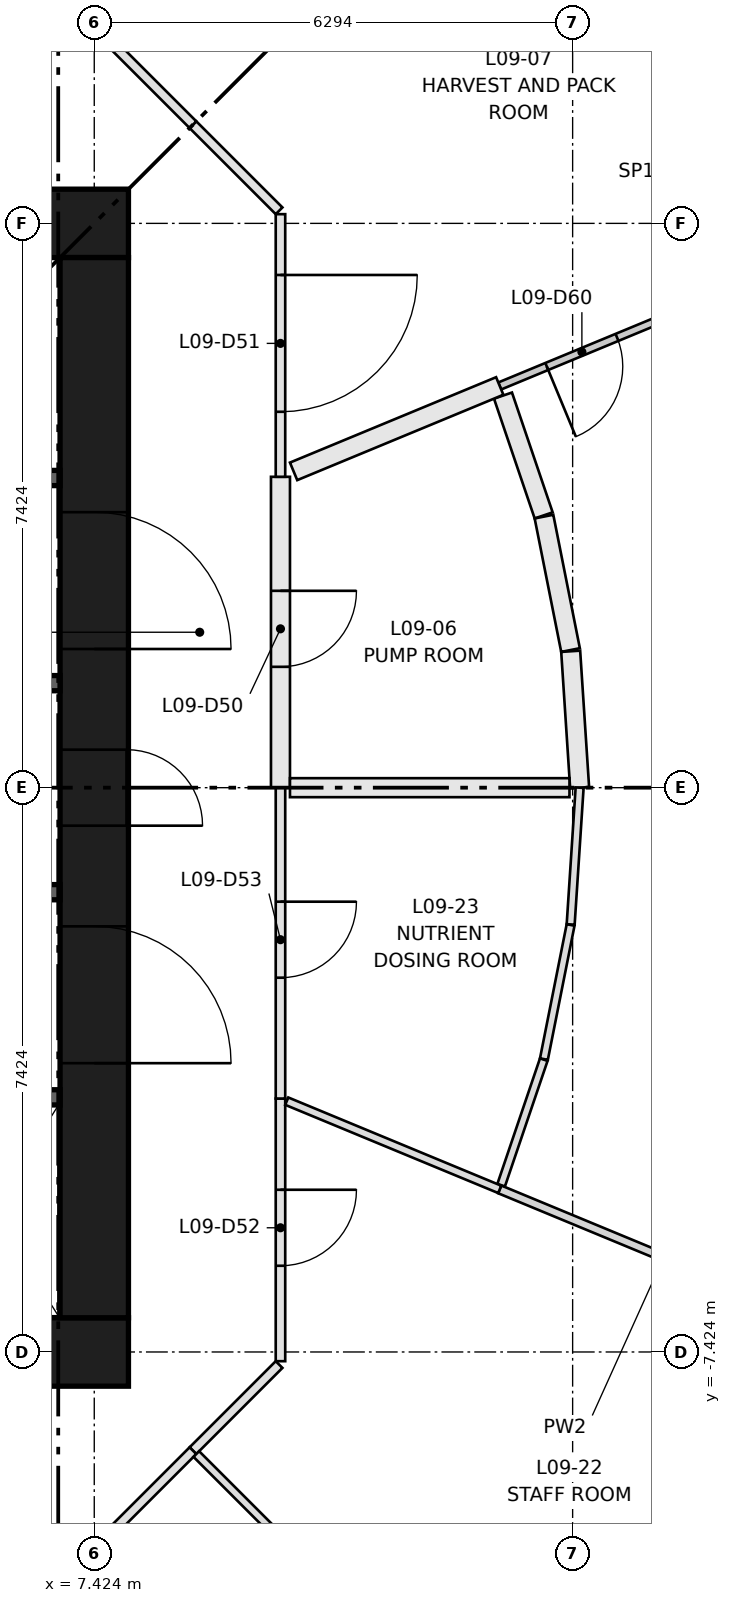
"""IFC4 building model, lengths in metres.
Left out: names, types, materials, properties, quantities, classifications, styles, units other than length and angle.
Written with IfcOpenShell. Run it as: python <this file> out.ifc"""

import sys

from ifc_helpers import new_model, si_unit, direction, frame, frame_2d, origin, place, context, subcontext, project, spatial, rectangle, extrude, element, fill, save


model = new_model("IFC4")
c1 = context("Model", 3, precision=1e-05, world=origin(), true_north=direction((0.0, 1.0)))
c2 = subcontext(c1, "Body", "Model", "MODEL_VIEW")
j1 = project(units=[si_unit("LENGTHUNIT", "METRE"), si_unit("PLANEANGLEUNIT", "RADIAN")], contexts=[c1])
p1 = place(None, origin())
s1 = spatial("IfcSite", under=j1, at=p1, CompositionType="ELEMENT")
p2 = place(p1, origin())
s2 = spatial("IfcBuilding", under=s1, at=p2, CompositionType="ELEMENT")
p3 = place(p2, frame((0.0, 0.0, 37.15)))
s3 = spatial("IfcBuildingStorey", under=s2, at=p3, CompositionType="ELEMENT", Elevation=37.15)
for number, where, z_axis, x_axis in (
    (1, (-7.874, -7.424, 0.0), (0.0, 0.0, 1.0), (1.0, 0.0, 0.0)),
    (2, (-7.874, 7.424, 0.0), (0.0, 0.0, 1.0), (1.0, 0.0, 0.0)),
):
    element("IfcWall", number, at=place(p3, frame(where, z_axis=z_axis, x_axis=x_axis)), inside=s3, PredefinedType="SHEAR", context=c2, shape_type="SweptSolid", body=[
        extrude(rectangle(XDim=15.748, YDim=0.9, at=frame_2d((7.874, 0.0))), origin(), (0.0, 0.0, 1.0), 3.65),
    ])
p4 = place(p3, frame((7.424, -6.974, 0.0), z_axis=(0.0, 0.0, 1.0), x_axis=(0.0, 1.0, 0.0)))
e3 = element("IfcWall", 3, at=p4, inside=s3, PredefinedType="SHEAR", context=c2, shape_type="SweptSolid", body=[
    extrude(rectangle(XDim=13.948, YDim=0.9, at=frame_2d((6.974, 0.0))), origin(), (0.0, 0.0, 1.0), 3.65),
])
p5 = place(p4, frame((6.474, 0.0, 0.0)))
e4 = element("IfcOpeningElement", 4, at=p5, cuts=e3, PredefinedType="OPENING", context=c2, shape_type="SweptSolid", body=[
    extrude(rectangle(XDim=1.0, YDim=2.1, at=frame_2d((0.5, 1.05))), frame((0.0, 0.46, 0.0), z_axis=(0.0, -1.0, 0.0), x_axis=(1.0, 0.0, 0.0)), (0.0, 0.0, 1.0), 0.92),
])
p6 = place(p4, frame((3.35, 0.0, 0.0)))
e5 = element("IfcOpeningElement", 5, at=p6, cuts=e3, PredefinedType="OPENING", context=c2, shape_type="SweptSolid", body=[
    extrude(rectangle(XDim=1.8, YDim=2.1, at=frame_2d((0.9, 1.05))), frame((0.0, 0.46, 0.0), z_axis=(0.0, -1.0, 0.0), x_axis=(1.0, 0.0, 0.0)), (0.0, 0.0, 1.0), 0.92),
])
p7 = place(p4, frame((8.799, 0.0, 0.0)))
e6 = element("IfcOpeningElement", 6, at=p7, cuts=e3, PredefinedType="OPENING", context=c2, shape_type="SweptSolid", body=[
    extrude(rectangle(XDim=1.8, YDim=2.1, at=frame_2d((0.9, 1.05))), frame((0.0, 0.46, 0.0), z_axis=(0.0, -1.0, 0.0), x_axis=(1.0, 0.0, 0.0)), (0.0, 0.0, 1.0), 0.92),
])
p8 = place(p3, frame((-6.974, -4.074, 0.0), z_axis=(0.0, 0.0, 1.0), x_axis=(1.0, 0.0, 0.0)))
e7 = element("IfcWall", 7, at=p8, inside=s3, PredefinedType="SHEAR", context=c2, shape_type="SweptSolid", body=[
    extrude(rectangle(XDim=13.948, YDim=0.2, at=frame_2d((6.974, 0.0))), origin(), (0.0, 0.0, 1.0), 3.3),
])
p9 = place(p8, frame((0.918, 0.0, 0.0)))
e8 = element("IfcOpeningElement", 8, at=p9, cuts=e7, PredefinedType="OPENING", context=c2, shape_type="SweptSolid", body=[
    extrude(rectangle(XDim=1.1, YDim=2.1, at=frame_2d((0.55, 1.05))), frame((0.0, 0.11, 0.0), z_axis=(0.0, -1.0, 0.0), x_axis=(1.0, 0.0, 0.0)), (0.0, 0.0, 1.0), 0.22),
])
p10 = place(p8, frame((4.055, 0.0, 0.0)))
e9 = element("IfcOpeningElement", 9, at=p10, cuts=e7, PredefinedType="OPENING", context=c2, shape_type="SweptSolid", body=[
    extrude(rectangle(XDim=1.1, YDim=2.1, at=frame_2d((0.55, 1.05))), frame((0.0, 0.11, 0.0), z_axis=(0.0, -1.0, 0.0), x_axis=(1.0, 0.0, 0.0)), (0.0, 0.0, 1.0), 0.22),
])
p11 = place(p8, frame((6.658, 0.0, 0.0)))
e10 = element("IfcOpeningElement", 10, at=p11, cuts=e7, PredefinedType="OPENING", context=c2, shape_type="SweptSolid", body=[
    extrude(rectangle(XDim=1.0, YDim=2.1, at=frame_2d((0.5, 1.05))), frame((0.0, 0.11, 0.0), z_axis=(0.0, -1.0, 0.0), x_axis=(1.0, 0.0, 0.0)), (0.0, 0.0, 1.0), 0.22),
])
p12 = place(p8, frame((8.627, 0.0, 0.0)))
e11 = element("IfcOpeningElement", 11, at=p12, cuts=e7, PredefinedType="OPENING", context=c2, shape_type="SweptSolid", body=[
    extrude(rectangle(XDim=1.0, YDim=2.1, at=frame_2d((0.5, 1.05))), frame((0.0, 0.11, 0.0), z_axis=(0.0, -1.0, 0.0), x_axis=(1.0, 0.0, 0.0)), (0.0, 0.0, 1.0), 0.22),
])
p13 = place(p8, frame((10.595, 0.0, 0.0)))
e12 = element("IfcOpeningElement", 12, at=p13, cuts=e7, PredefinedType="OPENING", context=c2, shape_type="SweptSolid", body=[
    extrude(rectangle(XDim=1.0, YDim=2.1, at=frame_2d((0.5, 1.05))), frame((0.0, 0.11, 0.0), z_axis=(0.0, -1.0, 0.0), x_axis=(1.0, 0.0, 0.0)), (0.0, 0.0, 1.0), 0.22),
])
p14 = place(p8, frame((12.564, 0.0, 0.0)))
e13 = element("IfcOpeningElement", 13, at=p14, cuts=e7, PredefinedType="OPENING", context=c2, shape_type="SweptSolid", body=[
    extrude(rectangle(XDim=1.0, YDim=2.1, at=frame_2d((0.5, 1.05))), frame((0.0, 0.11, 0.0), z_axis=(0.0, -1.0, 0.0), x_axis=(1.0, 0.0, 0.0)), (0.0, 0.0, 1.0), 0.22),
])
p15 = place(p3, frame((0.0, 4.074, 0.0), z_axis=(0.0, 0.0, 1.0), x_axis=(1.0, 0.0, 0.0)))
e14 = element("IfcWall", 14, at=p15, inside=s3, PredefinedType="SHEAR", context=c2, shape_type="SweptSolid", body=[
    extrude(rectangle(XDim=6.974, YDim=0.2, at=frame_2d((3.487, 0.0))), origin(), (0.0, 0.0, 1.0), 3.3),
])
p16 = place(p15, frame((0.754, 0.0, 0.0)))
e15 = element("IfcOpeningElement", 15, at=p16, cuts=e14, PredefinedType="OPENING", context=c2, shape_type="SweptSolid", body=[
    extrude(rectangle(XDim=1.0, YDim=2.1, at=frame_2d((0.5, 1.05))), frame((0.0, 0.11, 0.0), z_axis=(0.0, -1.0, 0.0), x_axis=(1.0, 0.0, 0.0)), (0.0, 0.0, 1.0), 0.22),
])
p17 = place(p15, frame((3.407, 0.0, 0.0)))
e16 = element("IfcOpeningElement", 16, at=p17, cuts=e14, PredefinedType="OPENING", context=c2, shape_type="SweptSolid", body=[
    extrude(rectangle(XDim=1.0, YDim=2.1, at=frame_2d((0.5, 1.05))), frame((0.0, 0.11, 0.0), z_axis=(0.0, -1.0, 0.0), x_axis=(1.0, 0.0, 0.0)), (0.0, 0.0, 1.0), 0.22),
])
p18 = place(p15, frame((5.79, 0.0, 0.0)))
e17 = element("IfcOpeningElement", 17, at=p18, cuts=e14, PredefinedType="OPENING", context=c2, shape_type="SweptSolid", body=[
    extrude(rectangle(XDim=0.8, YDim=2.1, at=frame_2d((0.4, 1.05))), frame((0.0, 0.11, 0.0), z_axis=(0.0, -1.0, 0.0), x_axis=(1.0, 0.0, 0.0)), (0.0, 0.0, 1.0), 0.22),
])
for number, where, z_axis, x_axis in (
    (18, (4.374, -1.375, 0.0), (0.0, 0.0, 1.0), (1.0, 0.0, 0.0)),
    (19, (4.374, 1.375, 0.0), (0.0, 0.0, 1.0), (1.0, 0.0, 0.0)),
):
    element("IfcWall", number, at=place(p3, frame(where, z_axis=z_axis, x_axis=x_axis)), inside=s3, PredefinedType="SHEAR", context=c2, shape_type="SweptSolid", body=[
        extrude(rectangle(XDim=2.6, YDim=0.2, at=frame_2d((1.3, 0.0))), origin(), (0.0, 0.0, 1.0), 3.3),
    ])
p19 = place(p3, frame((9.874, 4.09, 0.0), z_axis=(0.0, 0.0, 1.0), x_axis=(0.0, -1.0, 0.0)))
e20 = element("IfcWall", 20, at=p19, inside=s3, PredefinedType="PARTITIONING", context=c2, shape_type="SweptSolid", body=[
    extrude(rectangle(XDim=4.09, YDim=0.25, at=frame_2d((2.045, 0.0))), origin(), (0.0, 0.0, 1.0), 3.3),
])
p20 = place(p19, frame((1.5, 0.0, 0.0)))
e21 = element("IfcOpeningElement", 21, at=p20, cuts=e20, PredefinedType="OPENING", context=c2, shape_type="SweptSolid", body=[
    extrude(rectangle(XDim=1.0, YDim=2.1, at=frame_2d((0.5, 1.05))), frame((0.0, 0.135, 0.0), z_axis=(0.0, -1.0, 0.0), x_axis=(1.0, 0.0, 0.0)), (0.0, 0.0, 1.0), 0.27),
])
p21 = place(p3, frame((8.722, 8.722, 0.0), z_axis=(0.0, 0.0, 1.0), x_axis=(0.70718294931, -0.707030604857, 0.0)))
e22 = element("IfcWall", 22, at=p21, inside=s3, PredefinedType="PARTITIONING", context=c2, shape_type="SweptSolid", body=[
    extrude(rectangle(XDim=1.603, YDim=0.125, at=frame_2d((0.801, 0.0))), origin(), (0.0, 0.0, 1.0), 3.3),
])
p22 = place(p3, frame((9.874, 7.545, 0.0), z_axis=(0.0, 0.0, 1.0), x_axis=(0.0, -1.0, 0.0)))
e23 = element("IfcWall", 23, at=p22, inside=s3, PredefinedType="PARTITIONING", context=c2, shape_type="SweptSolid", body=[
    extrude(rectangle(XDim=3.455, YDim=0.125, at=frame_2d((1.728, 0.0))), origin(), (0.0, 0.0, 1.0), 3.3),
])
p23 = place(p22, frame((0.8, 0.0, 0.0)))
e24 = element("IfcOpeningElement", 24, at=p23, cuts=e23, PredefinedType="OPENING", context=c2, shape_type="SweptSolid", body=[
    extrude(rectangle(XDim=1.8, YDim=2.1, at=frame_2d((0.9, 1.05))), frame((0.0, 0.073, 0.0), z_axis=(0.0, -1.0, 0.0), x_axis=(1.0, 0.0, 0.0)), (0.0, 0.0, 1.0), 0.145),
])
p24 = place(p3, frame((9.856, -7.589, 0.0), z_axis=(0.0, 0.0, 1.0), x_axis=(-0.70718294931, -0.707030604857, 0.0)))
e25 = element("IfcWall", 25, at=p24, inside=s3, PredefinedType="PARTITIONING", context=c2, shape_type="SweptSolid", body=[
    extrude(rectangle(XDim=1.603, YDim=0.125, at=frame_2d((0.801, 0.0))), origin(), (0.0, 0.0, 1.0), 3.3),
])
p25 = place(p3, frame((9.874, -4.09, 0.0), z_axis=(0.0, 0.0, 1.0), x_axis=(0.0, -1.0, 0.0)))
e26 = element("IfcWall", 26, at=p25, inside=s3, PredefinedType="PARTITIONING", context=c2, shape_type="SweptSolid", body=[
    extrude(rectangle(XDim=3.455, YDim=0.125, at=frame_2d((1.728, 0.0))), origin(), (0.0, 0.0, 1.0), 3.3),
])
p26 = place(p25, frame((1.2, 0.0, 0.0)))
e27 = element("IfcOpeningElement", 27, at=p26, cuts=e26, PredefinedType="OPENING", context=c2, shape_type="SweptSolid", body=[
    extrude(rectangle(XDim=1.0, YDim=2.1, at=frame_2d((0.5, 1.05))), frame((0.0, 0.073, 0.0), z_axis=(0.0, -1.0, 0.0), x_axis=(1.0, 0.0, 0.0)), (0.0, 0.0, 1.0), 0.145),
])
p27 = place(p3, frame((9.874, 0.0, 0.0), z_axis=(0.0, 0.0, 1.0), x_axis=(0.0, -1.0, 0.0)))
e28 = element("IfcWall", 28, at=p27, inside=s3, PredefinedType="PARTITIONING", context=c2, shape_type="SweptSolid", body=[
    extrude(rectangle(XDim=4.09, YDim=0.125, at=frame_2d((2.045, 0.0))), origin(), (0.0, 0.0, 1.0), 3.3),
])
p28 = place(p27, frame((1.5, 0.0, 0.0)))
e29 = element("IfcOpeningElement", 29, at=p28, cuts=e28, PredefinedType="OPENING", context=c2, shape_type="SweptSolid", body=[
    extrude(rectangle(XDim=1.0, YDim=2.1, at=frame_2d((0.5, 1.05))), frame((0.0, 0.073, 0.0), z_axis=(0.0, -1.0, 0.0), x_axis=(1.0, 0.0, 0.0)), (0.0, 0.0, 1.0), 0.145),
])
for number, where, z_axis, x_axis in (
    (30, (7.589, 9.856, 0.0), (0.0, 0.0, 1.0), (0.707, -0.707, 0.0)),
    (31, (8.722, -8.722, 0.0), (0.0, 0.0, 1.0), (-0.707, -0.707, 0.0)),
):
    element("IfcWall", number, at=place(p3, frame(where, z_axis=z_axis, x_axis=x_axis)), inside=s3, PredefinedType="PARTITIONING", context=c2, shape_type="SweptSolid", body=[
        extrude(rectangle(XDim=1.603, YDim=0.125, at=frame_2d((0.801, 0.0))), origin(), (0.0, 0.0, 1.0), 3.3),
    ])
p29 = place(p3, frame((13.337, 3.582, 0.0), z_axis=(0.0, 0.0, 1.0), x_axis=(-0.321458381335, 0.946923708157, 0.0)))
e32 = element("IfcWall", 32, at=p29, inside=s3, PredefinedType="PARTITIONING", context=c2, shape_type="SweptSolid", body=[
    extrude(rectangle(XDim=1.665, YDim=0.25, at=frame_2d((0.833, 0.0))), origin(), (0.0, 0.0, 1.0), 3.3),
])
p30 = place(p3, frame((13.69, 1.811, 0.0), z_axis=(0.0, 0.0, 1.0), x_axis=(-0.195014530736, 0.980800353182, 0.0)))
e33 = element("IfcWall", 33, at=p30, inside=s3, PredefinedType="PARTITIONING", context=c2, shape_type="SweptSolid", body=[
    extrude(rectangle(XDim=1.79, YDim=0.25, at=frame_2d((0.895, 0.0))), origin(), (0.0, 0.0, 1.0), 3.3),
])
p31 = place(p3, frame((13.81, 0.0, 0.0), z_axis=(0.0, 0.0, 1.0), x_axis=(-0.065437674742, 0.997856658406, 0.0)))
e34 = element("IfcWall", 34, at=p31, inside=s3, PredefinedType="PARTITIONING", context=c2, shape_type="SweptSolid", body=[
    extrude(rectangle(XDim=1.798, YDim=0.25, at=frame_2d((0.899, 0.0))), origin(), (0.0, 0.0, 1.0), 3.3),
])
p32 = place(p3, frame((17.073, 7.072, 0.0), z_axis=(0.0, 0.0, 1.0), x_axis=(-0.92387920118, -0.382684232268, 0.0)))
e35 = element("IfcWall", 35, at=p32, inside=s3, PredefinedType="PARTITIONING", context=c2, shape_type="SweptSolid", body=[
    extrude(rectangle(XDim=4.67, YDim=0.1, at=frame_2d((2.335, 0.0))), origin(), (0.0, 0.0, 1.0), 3.3),
])
p33 = place(p32, frame((3.0, 0.0, 0.0)))
e36 = element("IfcOpeningElement", 36, at=p33, cuts=e35, PredefinedType="OPENING", context=c2, shape_type="SweptSolid", body=[
    extrude(rectangle(XDim=1.0, YDim=2.1, at=frame_2d((0.5, 1.05))), frame((0.0, 0.06, 0.0), z_axis=(0.0, -1.0, 0.0), x_axis=(1.0, 0.0, 0.0)), (0.0, 0.0, 1.0), 0.12),
])
p34 = place(p3, frame((17.073, -7.072, 0.0), z_axis=(0.0, 0.0, 1.0), x_axis=(-0.92387920118, 0.382684232268, 0.0)))
e37 = element("IfcWall", 37, at=p34, inside=s3, PredefinedType="PARTITIONING", context=c2, shape_type="SweptSolid", body=[
    extrude(rectangle(XDim=4.67, YDim=0.11, at=frame_2d((2.335, 0.0))), origin(), (0.0, 0.0, 1.0), 3.3),
])
p35 = place(p3, frame((12.778, -5.229, 0.0), z_axis=(0.0, 0.0, 1.0), x_axis=(0.321513757885, 0.946904907311, 0.0)))
e38 = element("IfcWall", 38, at=p35, inside=s3, PredefinedType="PARTITIONING", context=c2, shape_type="SweptSolid", body=[
    extrude(rectangle(XDim=1.744, YDim=0.105, at=frame_2d((0.872, 0.0))), origin(), (0.0, 0.0, 1.0), 3.3),
])
p36 = place(p3, frame((13.34, -3.571, 0.0), z_axis=(0.0, 0.0, 1.0), x_axis=(0.195098478373, 0.980783657968, 0.0)))
e39 = element("IfcWall", 39, at=p36, inside=s3, PredefinedType="PARTITIONING", context=c2, shape_type="SweptSolid", body=[
    extrude(rectangle(XDim=1.8, YDim=0.105, at=frame_2d((0.9, 0.0))), origin(), (0.0, 0.0, 1.0), 3.3),
])
p37 = place(p3, frame((13.692, -1.799, 0.0), z_axis=(0.0, 0.0, 1.0), x_axis=(0.065395671101, 0.997859412042, 0.0)))
e40 = element("IfcWall", 40, at=p37, inside=s3, PredefinedType="PARTITIONING", context=c2, shape_type="SweptSolid", body=[
    extrude(rectangle(XDim=1.803, YDim=0.105, at=frame_2d((0.902, 0.0))), origin(), (0.0, 0.0, 1.0), 3.3),
])
p38 = place(p3, frame((10.047, 4.162, 0.0), z_axis=(0.0, 0.0, 1.0), x_axis=(0.92388200997, 0.382677451195, 0.0)))
e41 = element("IfcWall", 41, at=p38, inside=s3, PredefinedType="PARTITIONING", context=c2, shape_type="SweptSolid", body=[
    extrude(rectangle(XDim=2.935, YDim=0.25, at=frame_2d((1.468, 0.0))), origin(), (0.0, 0.0, 1.0), 3.3),
])
p39 = place(p3, frame((13.677, 0.0, 0.0), z_axis=(0.0, 0.0, 1.0), x_axis=(-1.0, 0.0, 0.0)))
e42 = element("IfcWall", 42, at=p39, inside=s3, PredefinedType="PARTITIONING", context=c2, shape_type="SweptSolid", body=[
    extrude(rectangle(XDim=3.677, YDim=0.25, at=frame_2d((1.839, 0.0))), origin(), (0.0, 0.0, 1.0), 3.3),
])
p40 = place(p3, frame((8.767, -8.767, 0.0), z_axis=(0.0, 0.0, 1.0), x_axis=(0.707106781187, -0.707106781187, 0.0)))
e43 = element("IfcWall", 43, at=p40, inside=s3, PredefinedType="PARTITIONING", context=c2, shape_type="SweptSolid", body=[
    extrude(rectangle(XDim=6.082, YDim=0.105, at=frame_2d((3.041, 0.0))), origin(), (0.0, 0.0, 1.0), 3.3),
])
p41 = place(p3, frame((9.957, -4.124, 0.0), z_axis=(0.0, 0.0, 1.0), x_axis=(0.923860842545, -0.382728550819, 0.0)))
e44 = element("IfcWall", 44, at=p41, inside=s3, PredefinedType="PARTITIONING", context=c2, shape_type="SweptSolid", body=[
    extrude(rectangle(XDim=3.033, YDim=0.105, at=frame_2d((1.517, 0.0))), origin(), (0.0, 0.0, 1.0), 3.3),
])
p42 = place(p5, frame((1.0, 0.0, 0.0), z_axis=(0.0, 0.0, 1.0), x_axis=(-1.0, 0.0, 0.0)))
e45 = element("IfcDoor", 45, at=p42, inside=s3, OperationType="SINGLE_SWING_LEFT", PredefinedType="DOOR", context=c2, shape_type="SweptSolid", body=[
    extrude(rectangle(XDim=1.0, YDim=2.1, at=frame_2d((0.5, 1.05))), frame((0.0, 0.45, 0.0), z_axis=(0.0, -1.0, 0.0), x_axis=(1.0, 0.0, 0.0)), (0.0, 0.0, 1.0), 0.05),
])
fill(e4, e45)
p43 = place(p6, frame((1.8, 0.0, 0.0), z_axis=(0.0, 0.0, 1.0), x_axis=(-1.0, 0.0, 0.0)))
e46 = element("IfcDoor", 46, at=p43, inside=s3, OperationType="DOUBLE_DOOR_SINGLE_SWING", PredefinedType="DOOR", context=c2, shape_type="SweptSolid", body=[
    extrude(rectangle(XDim=1.8, YDim=2.1, at=frame_2d((0.9, 1.05))), frame((0.0, 0.025, 0.0), z_axis=(0.0, -1.0, 0.0), x_axis=(1.0, 0.0, 0.0)), (0.0, 0.0, 1.0), 0.05),
])
fill(e5, e46)
p44 = place(p7, frame((1.8, 0.0, 0.0), z_axis=(0.0, 0.0, 1.0), x_axis=(-1.0, 0.0, 0.0)))
e47 = element("IfcDoor", 47, at=p44, inside=s3, OperationType="DOUBLE_DOOR_SINGLE_SWING", PredefinedType="DOOR", context=c2, shape_type="SweptSolid", body=[
    extrude(rectangle(XDim=1.8, YDim=2.1, at=frame_2d((0.9, 1.05))), frame((0.0, 0.025, 0.0), z_axis=(0.0, -1.0, 0.0), x_axis=(1.0, 0.0, 0.0)), (0.0, 0.0, 1.0), 0.05),
])
fill(e6, e47)
p45 = place(p20, origin())
e48 = element("IfcDoor", 48, at=p45, inside=s3, OperationType="SINGLE_SWING_LEFT", PredefinedType="DOOR", context=c2, shape_type="SweptSolid", body=[
    extrude(rectangle(XDim=1.0, YDim=2.1, at=frame_2d((0.5, 1.05))), frame((0.0, 0.025, 0.0), z_axis=(0.0, -1.0, 0.0), x_axis=(1.0, 0.0, 0.0)), (0.0, 0.0, 1.0), 0.05),
])
fill(e21, e48)
p46 = place(p23, origin())
e49 = element("IfcDoor", 49, at=p46, inside=s3, OperationType="DOUBLE_DOOR_SINGLE_SWING", PredefinedType="DOOR", context=c2, shape_type="SweptSolid", body=[
    extrude(rectangle(XDim=1.8, YDim=2.1, at=frame_2d((0.9, 1.05))), frame((0.0, 0.025, 0.0), z_axis=(0.0, -1.0, 0.0), x_axis=(1.0, 0.0, 0.0)), (0.0, 0.0, 1.0), 0.05),
])
fill(e24, e49)
p47 = place(p26, origin())
e50 = element("IfcDoor", 50, at=p47, inside=s3, OperationType="SINGLE_SWING_LEFT", PredefinedType="DOOR", context=c2, shape_type="SweptSolid", body=[
    extrude(rectangle(XDim=1.0, YDim=2.1, at=frame_2d((0.5, 1.05))), frame((0.0, 0.025, 0.0), z_axis=(0.0, -1.0, 0.0), x_axis=(1.0, 0.0, 0.0)), (0.0, 0.0, 1.0), 0.05),
])
fill(e27, e50)
p48 = place(p28, origin())
e51 = element("IfcDoor", 51, at=p48, inside=s3, OperationType="SINGLE_SWING_LEFT", PredefinedType="DOOR", context=c2, shape_type="SweptSolid", body=[
    extrude(rectangle(XDim=1.0, YDim=2.1, at=frame_2d((0.5, 1.05))), frame((0.0, 0.025, 0.0), z_axis=(0.0, -1.0, 0.0), x_axis=(1.0, 0.0, 0.0)), (0.0, 0.0, 1.0), 0.05),
])
fill(e29, e51)
p49 = place(p33, origin())
e52 = element("IfcDoor", 52, at=p49, inside=s3, OperationType="SINGLE_SWING_RIGHT", PredefinedType="DOOR", context=c2, shape_type="SweptSolid", body=[
    extrude(rectangle(XDim=1.0, YDim=2.1, at=frame_2d((0.5, 1.05))), frame((0.0, 0.025, 0.0), z_axis=(0.0, -1.0, 0.0), x_axis=(1.0, 0.0, 0.0)), (0.0, 0.0, 1.0), 0.05),
])
fill(e36, e52)
save(model, sys.argv[1])
